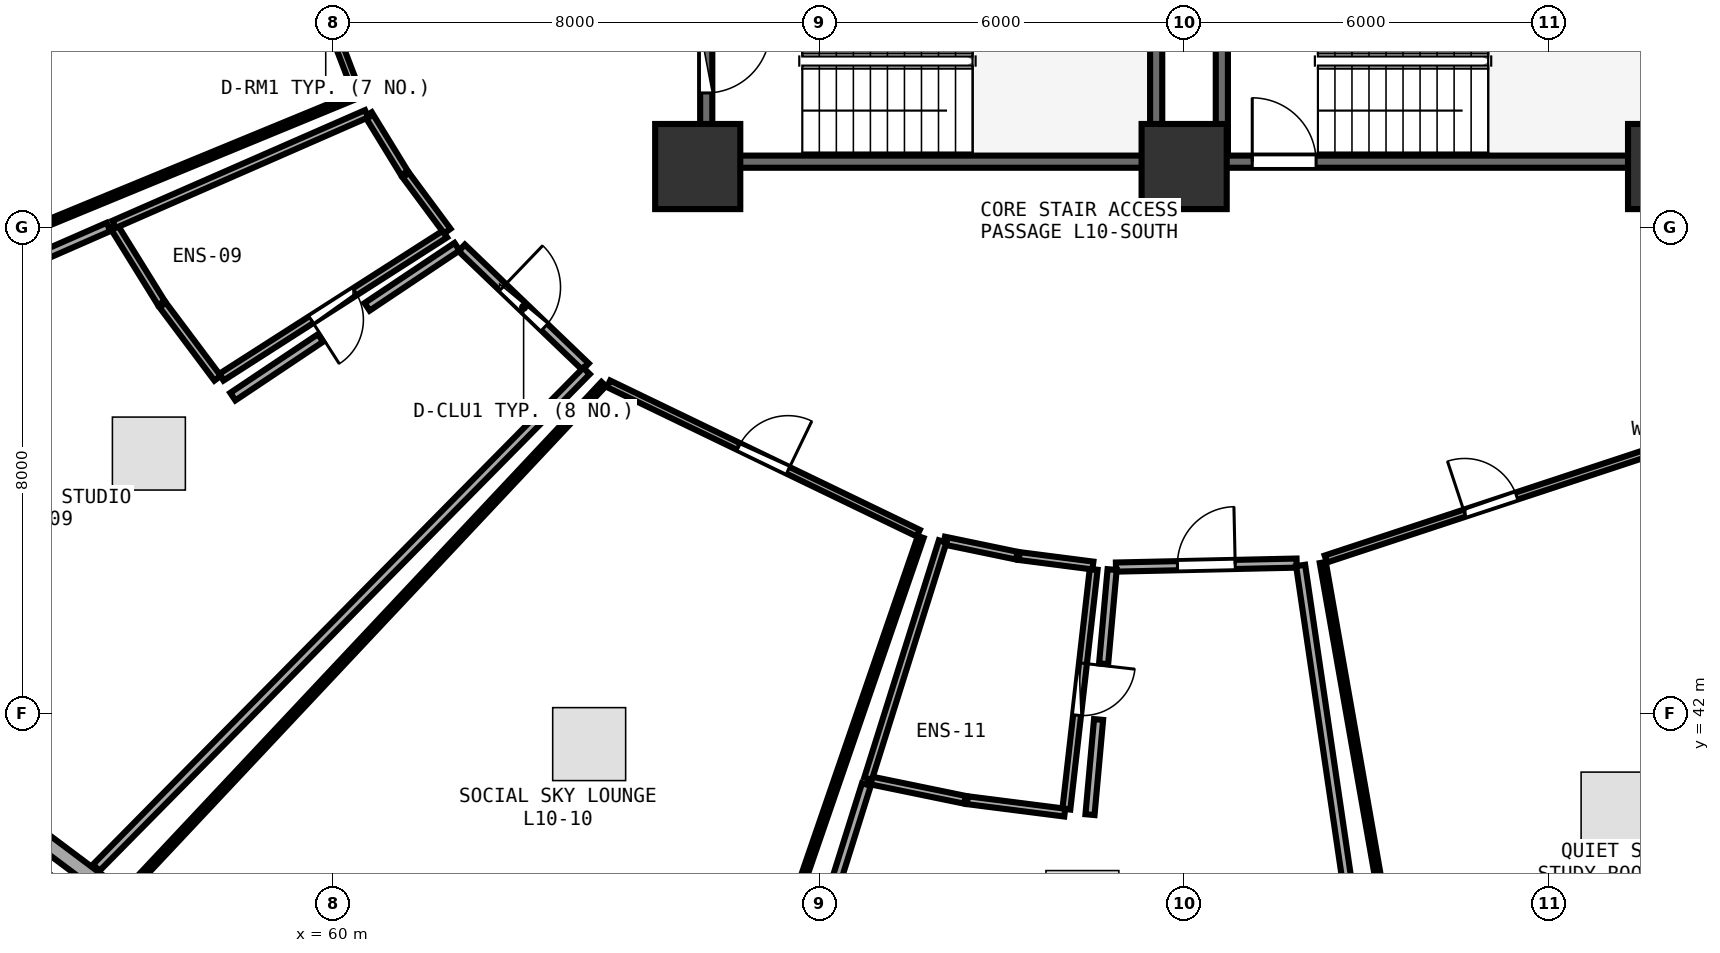
"""IFC4 building model, lengths in metres.
Left out: names, types, materials, properties, quantities, classifications, styles, units other than length and angle.
Written with IfcOpenShell. Run it as: python <this file> out.ifc"""

import sys

from ifc_helpers import new_model, si_unit, direction, frame, frame_2d, origin, origin_2d, place, context, subcontext, project, spatial, rectangle, extrude, element, fill, save


model = new_model("IFC4")
c1 = context("Model", 3, precision=1e-05, world=origin(), true_north=direction((0.0, 1.0)))
c2 = subcontext(c1, "Body", "Model", "MODEL_VIEW")
j1 = project(units=[si_unit("LENGTHUNIT", "METRE"), si_unit("PLANEANGLEUNIT", "RADIAN")], contexts=[c1])
p1 = place(None, origin())
s1 = spatial("IfcSite", under=j1, at=p1, CompositionType="ELEMENT")
p2 = place(p1, origin())
s2 = spatial("IfcBuilding", under=s1, at=p2, CompositionType="ELEMENT")
p3 = place(p2, frame((0.0, 0.0, 41.25)))
s3 = spatial("IfcBuildingStorey", under=s2, at=p3, CompositionType="ELEMENT", Elevation=41.25)
for number, where, z_axis, x_axis in (
    (1, (66.0, 51.0, 0.0), (0.0, 0.0, 1.0), (1.0, 0.0, 0.0)),
    (2, (74.0, 51.0, 0.0), (0.0, 0.0, 1.0), (1.0, 0.0, 0.0)),
    (3, (82.0, 51.0, 0.0), (0.0, 0.0, 1.0), (1.0, 0.0, 0.0)),
):
    element("IfcColumn", number, at=place(p3, frame(where, z_axis=z_axis, x_axis=x_axis)), inside=s3, PredefinedType="PILASTER", context=c2, shape_type="SweptSolid", body=[
        extrude(rectangle(XDim=1.4, YDim=1.4, at=origin_2d()), origin(), (0.0, 0.0, 1.0), 3.75),
    ])
p4 = place(p3, frame((53.016, 41.582, 0.0), z_axis=(0.0, 0.0, 1.0), x_axis=(0.80030733173, -0.599590005569, 0.0)))
e4 = element("IfcWall", 4, at=p4, inside=s3, PredefinedType="SOLIDWALL", context=c2, shape_type="SweptSolid", body=[
    extrude(rectangle(XDim=8.291, YDim=0.26, at=frame_2d((4.145, 0.0))), origin(), (0.0, 0.0, 1.0), 3.475),
])
p5 = place(p4, frame((4.785, 0.0, 0.85)))
e5 = element("IfcOpeningElement", 5, at=p5, cuts=e4, PredefinedType="OPENING", context=c2, shape_type="SweptSolid", body=[
    extrude(rectangle(XDim=1.6, YDim=1.45, at=frame_2d((0.8, 0.725))), frame((0.0, 0.14, 0.0), z_axis=(0.0, -1.0, 0.0), x_axis=(1.0, 0.0, 0.0)), (0.0, 0.0, 1.0), 0.28),
])
p6 = place(p3, frame((74.0, 51.08, 0.0), z_axis=(0.0, 0.0, 1.0), x_axis=(1.0, 0.0, 0.0)))
e6 = element("IfcWall", 6, at=p6, inside=s3, PredefinedType="SHEAR", context=c2, shape_type="SweptSolid", body=[
    extrude(rectangle(XDim=7.9, YDim=0.2, at=frame_2d((3.95, 0.0))), origin(), (0.0, 0.0, 1.0), 3.49),
])
p7 = place(p6, frame((1.12, 0.0, 0.0)))
e7 = element("IfcOpeningElement", 7, at=p7, cuts=e6, PredefinedType="OPENING", context=c2, shape_type="SweptSolid", body=[
    extrude(rectangle(XDim=1.05, YDim=2.1, at=frame_2d((0.525, 1.05))), frame((0.0, 0.11, 0.0), z_axis=(0.0, -1.0, 0.0), x_axis=(1.0, 0.0, 0.0)), (0.0, 0.0, 1.0), 0.22),
])
p8 = place(p3, frame((74.62, 54.27, 0.0), z_axis=(0.0, 0.0, 1.0), x_axis=(0.0, -1.0, 0.0)))
e8 = element("IfcWall", 8, at=p8, inside=s3, PredefinedType="SHEAR", context=c2, shape_type="SweptSolid", body=[
    extrude(rectangle(XDim=3.07, YDim=0.2, at=frame_2d((1.535, 0.0))), origin(), (0.0, 0.0, 1.0), 3.49),
])
p9 = place(p3, frame((66.26, 51.08, 0.0), z_axis=(0.0, 0.0, 1.0), x_axis=(1.0, 0.0, 0.0)))
e9 = element("IfcWall", 9, at=p9, inside=s3, PredefinedType="SHEAR", context=c2, shape_type="SweptSolid", body=[
    extrude(rectangle(XDim=7.16, YDim=0.2, at=frame_2d((3.58, 0.0))), origin(), (0.0, 0.0, 1.0), 3.49),
])
p10 = place(p3, frame((73.54, 51.2, 0.0), z_axis=(0.0, 0.0, 1.0), x_axis=(0.0, 1.0, 0.0)))
e10 = element("IfcWall", 10, at=p10, inside=s3, PredefinedType="SHEAR", context=c2, shape_type="SweptSolid", body=[
    extrude(rectangle(XDim=3.07, YDim=0.2, at=frame_2d((1.535, 0.0))), origin(), (0.0, 0.0, 1.0), 3.49),
])
p11 = place(p3, frame((66.14, 54.27, 0.0), z_axis=(0.0, 0.0, 1.0), x_axis=(0.0, -1.0, 0.0)))
e11 = element("IfcWall", 11, at=p11, inside=s3, PredefinedType="SHEAR", context=c2, shape_type="SweptSolid", body=[
    extrude(rectangle(XDim=3.07, YDim=0.2, at=frame_2d((1.535, 0.0))), origin(), (0.0, 0.0, 1.0), 3.49),
])
p12 = place(p11, frame((1.01, 0.0, 0.0)))
e12 = element("IfcOpeningElement", 12, at=p12, cuts=e11, PredefinedType="OPENING", context=c2, shape_type="SweptSolid", body=[
    extrude(rectangle(XDim=1.05, YDim=2.1, at=frame_2d((0.525, 1.05))), frame((0.0, 0.11, 0.0), z_axis=(0.0, -1.0, 0.0), x_axis=(1.0, 0.0, 0.0)), (0.0, 0.0, 1.0), 0.22),
])
p13 = place(p3, frame((59.373, 54.891, 0.0), z_axis=(0.0, 0.0, 1.0), x_axis=(0.357203455119, -0.934026601147, 0.0)))
e13 = element("IfcWall", 13, at=p13, inside=s3, PredefinedType="PARTITIONING", context=c2, shape_type="SweptSolid", body=[
    extrude(rectangle(XDim=2.848, YDim=0.12, at=frame_2d((1.424, 0.0))), origin(), (0.0, 0.0, 1.0), 3.48),
])
p14 = place(p13, frame((0.974, 0.0, 0.0)))
e14 = element("IfcOpeningElement", 14, at=p14, cuts=e13, PredefinedType="OPENING", context=c2, shape_type="SweptSolid", body=[
    extrude(rectangle(XDim=0.9, YDim=2.08, at=frame_2d((0.45, 1.04))), frame((0.0, 0.07, 0.0), z_axis=(0.0, -1.0, 0.0), x_axis=(1.0, 0.0, 0.0)), (0.0, 0.0, 1.0), 0.14),
])
p15 = place(p3, frame((61.844, 49.89, 0.0), z_axis=(0.0, 0.0, 1.0), x_axis=(-0.842235862163, -0.539109221297, 0.0)))
e15 = element("IfcWall", 15, at=p15, inside=s3, PredefinedType="PLUMBINGWALL", context=c2, shape_type="SweptSolid", body=[
    extrude(rectangle(XDim=4.367, YDim=0.13, at=frame_2d((2.184, 0.0))), origin(), (0.0, 0.0, 1.0), 3.235),
])
p16 = place(p15, frame((1.754, 0.0, 0.0)))
e16 = element("IfcOpeningElement", 16, at=p16, cuts=e15, PredefinedType="OPENING", context=c2, shape_type="SweptSolid", body=[
    extrude(rectangle(XDim=0.86, YDim=2.05, at=frame_2d((0.43, 1.025))), frame((0.0, 0.075, 0.0), z_axis=(0.0, -1.0, 0.0), x_axis=(1.0, 0.0, 0.0)), (0.0, 0.0, 1.0), 0.15),
])
p17 = place(p3, frame((62.118, 49.663, 0.0), z_axis=(0.0, 0.0, 1.0), x_axis=(0.721698326825, -0.692207718144, 0.0)))
e17 = element("IfcWall", 17, at=p17, inside=s3, PredefinedType="PARTITIONING", context=c2, shape_type="SweptSolid", body=[
    extrude(rectangle(XDim=2.823, YDim=0.15, at=frame_2d((1.412, 0.0))), origin(), (0.0, 0.0, 1.0), 2.875),
])
p18 = place(p17, frame((0.936, 0.0, 0.0)))
e18 = element("IfcOpeningElement", 18, at=p18, cuts=e17, PredefinedType="OPENING", context=c2, shape_type="SweptSolid", body=[
    extrude(rectangle(XDim=0.95, YDim=2.08, at=frame_2d((0.475, 1.04))), frame((0.0, 0.085, 0.0), z_axis=(0.0, -1.0, 0.0), x_axis=(1.0, 0.0, 0.0)), (0.0, 0.0, 1.0), 0.17),
])
p19 = place(p3, frame((64.534, 47.427, 0.0), z_axis=(0.0, 0.0, 1.0), x_axis=(0.900751487373, -0.434334845477, 0.0)))
e19 = element("IfcWall", 19, at=p19, inside=s3, PredefinedType="PARTITIONING", context=c2, shape_type="SweptSolid", body=[
    extrude(rectangle(XDim=5.654, YDim=0.12, at=frame_2d((2.827, 0.0))), origin(), (0.0, 0.0, 1.0), 2.875),
])
p20 = place(p19, frame((2.377, 0.0, 0.0)))
e20 = element("IfcOpeningElement", 20, at=p20, cuts=e19, PredefinedType="OPENING", context=c2, shape_type="SweptSolid", body=[
    extrude(rectangle(XDim=0.9, YDim=2.08, at=frame_2d((0.45, 1.04))), frame((0.0, 0.07, 0.0), z_axis=(0.0, -1.0, 0.0), x_axis=(1.0, 0.0, 0.0)), (0.0, 0.0, 1.0), 0.14),
])
p21 = place(p3, frame((72.512, 44.376, 0.0), z_axis=(0.0, 0.0, 1.0), x_axis=(-0.113232612293, -0.993568505697, 0.0)))
e21 = element("IfcWall", 21, at=p21, inside=s3, PredefinedType="PLUMBINGWALL", context=c2, shape_type="SweptSolid", body=[
    extrude(rectangle(XDim=3.969, YDim=0.13, at=frame_2d((1.985, 0.0))), origin(), (0.0, 0.0, 1.0), 3.175),
])
p22 = place(p21, frame((1.555, 0.0, 0.0)))
e22 = element("IfcOpeningElement", 22, at=p22, cuts=e21, PredefinedType="OPENING", context=c2, shape_type="SweptSolid", body=[
    extrude(rectangle(XDim=0.86, YDim=2.05, at=frame_2d((0.43, 1.025))), frame((0.0, 0.075, 0.0), z_axis=(0.0, -1.0, 0.0), x_axis=(1.0, 0.0, 0.0)), (0.0, 0.0, 1.0), 0.15),
])
p23 = place(p3, frame((72.879, 44.413, 0.0), z_axis=(0.0, 0.0, 1.0), x_axis=(0.999757617916, 0.022016026426, 0.0)))
e23 = element("IfcWall", 23, at=p23, inside=s3, PredefinedType="PARTITIONING", context=c2, shape_type="SweptSolid", body=[
    extrude(rectangle(XDim=2.972, YDim=0.15, at=frame_2d((1.486, 0.0))), origin(), (0.0, 0.0, 1.0), 3.48),
])
p24 = place(p23, frame((1.011, 0.0, 0.0)))
e24 = element("IfcOpeningElement", 24, at=p24, cuts=e23, PredefinedType="OPENING", context=c2, shape_type="SweptSolid", body=[
    extrude(rectangle(XDim=0.95, YDim=2.08, at=frame_2d((0.475, 1.04))), frame((0.0, 0.085, 0.0), z_axis=(0.0, -1.0, 0.0), x_axis=(1.0, 0.0, 0.0)), (0.0, 0.0, 1.0), 0.17),
])
p25 = place(p3, frame((76.33, 44.546, 0.0), z_axis=(0.0, 0.0, 1.0), x_axis=(0.949607265123, 0.313442246716, 0.0)))
e25 = element("IfcWall", 25, at=p25, inside=s3, PredefinedType="PARTITIONING", context=c2, shape_type="SweptSolid", body=[
    extrude(rectangle(XDim=5.708, YDim=0.12, at=frame_2d((2.854, 0.0))), origin(), (0.0, 0.0, 1.0), 2.875),
])
p26 = place(p25, frame((2.404, 0.0, 0.0)))
e26 = element("IfcOpeningElement", 26, at=p26, cuts=e25, PredefinedType="OPENING", context=c2, shape_type="SweptSolid", body=[
    extrude(rectangle(XDim=0.9, YDim=2.08, at=frame_2d((0.45, 1.04))), frame((0.0, 0.07, 0.0), z_axis=(0.0, -1.0, 0.0), x_axis=(1.0, 0.0, 0.0)), (0.0, 0.0, 1.0), 0.14),
])
p27 = place(p3, frame((60.375, 52.16, 0.0), z_axis=(0.0, 0.0, 1.0), x_axis=(-0.924608681042, -0.380918346817, 0.0)))
e27 = element("IfcWall", 27, at=p27, inside=s3, PredefinedType="PARTITIONING", context=c2, shape_type="SweptSolid", body=[
    extrude(rectangle(XDim=12.094, YDim=0.1, at=frame_2d((6.047, 0.0))), origin(), (0.0, 0.0, 1.0), 2.875),
])
p28 = place(p3, frame((47.257, 52.525, 0.0), z_axis=(0.0, 0.0, 1.0), x_axis=(0.980535537362, 0.196341691878, 0.0)))
e28 = element("IfcWall", 28, at=p28, inside=s3, PredefinedType="PARTITIONING", context=c2, shape_type="SweptSolid", body=[
    extrude(rectangle(XDim=8.95, YDim=0.1, at=frame_2d((4.475, 0.0))), origin(), (0.0, 0.0, 1.0), 2.875),
])
p29 = place(p3, frame((60.583, 51.859, 0.0), z_axis=(0.0, 0.0, 1.0), x_axis=(0.52310141153, -0.852270446077, 0.0)))
e29 = element("IfcWall", 29, at=p29, inside=s3, PredefinedType="PLUMBINGWALL", context=c2, shape_type="SweptSolid", body=[
    extrude(rectangle(XDim=1.135, YDim=0.13, at=frame_2d((0.568, 0.0))), origin(), (0.0, 0.0, 1.0), 3.48),
])
p30 = place(p3, frame((61.2, 50.858, 0.0), z_axis=(0.0, 0.0, 1.0), x_axis=(0.595625136946, -0.803262532574, 0.0)))
e30 = element("IfcWall", 30, at=p30, inside=s3, PredefinedType="PLUMBINGWALL", context=c2, shape_type="SweptSolid", body=[
    extrude(rectangle(XDim=1.145, YDim=0.13, at=frame_2d((0.573, 0.0))), origin(), (0.0, 0.0, 1.0), 2.875),
])
p31 = place(p3, frame((58.103, 47.519, 0.0), z_axis=(0.0, 0.0, 1.0), x_axis=(-0.599662382917, 0.800253101533, 0.0)))
e31 = element("IfcWall", 31, at=p31, inside=s3, PredefinedType="PLUMBINGWALL", context=c2, shape_type="SweptSolid", body=[
    extrude(rectangle(XDim=1.504, YDim=0.13, at=frame_2d((0.752, 0.0))), origin(), (0.0, 0.0, 1.0), 3.48),
])
p32 = place(p3, frame((57.178, 48.756, 0.0), z_axis=(0.0, 0.0, 1.0), x_axis=(-0.526861637299, 0.849951066323, 0.0)))
e32 = element("IfcWall", 32, at=p32, inside=s3, PredefinedType="PLUMBINGWALL", context=c2, shape_type="SweptSolid", body=[
    extrude(rectangle(XDim=1.492, YDim=0.13, at=frame_2d((0.746, 0.0))), origin(), (0.0, 0.0, 1.0), 3.48),
])
p33 = place(p3, frame((56.4, 50.049, 0.0), z_axis=(0.0, 0.0, 1.0), x_axis=(0.91604857307, 0.401067340701, 0.0)))
e33 = element("IfcWall", 33, at=p33, inside=s3, PredefinedType="PLUMBINGWALL", context=c2, shape_type="SweptSolid", body=[
    extrude(rectangle(XDim=4.535, YDim=0.13, at=frame_2d((2.268, 0.0))), origin(), (0.0, 0.0, 1.0), 2.875),
])
p34 = place(p3, frame((64.171, 47.638, 0.0), z_axis=(0.0, 0.0, 1.0), x_axis=(-0.702465266663, -0.711718026421, 0.0)))
e34 = element("IfcWall", 34, at=p34, inside=s3, PredefinedType="PARTITIONING", context=c2, shape_type="SweptSolid", body=[
    extrude(rectangle(XDim=11.478, YDim=0.15, at=frame_2d((5.739, 0.0))), origin(), (0.0, 0.0, 1.0), 2.875),
])
p35 = place(p3, frame((49.487, 47.017, 0.0), z_axis=(0.0, 0.0, 1.0), x_axis=(0.915920983282, 0.401358633124, 0.0)))
e35 = element("IfcWall", 35, at=p35, inside=s3, PredefinedType="PARTITIONING", context=c2, shape_type="SweptSolid", body=[
    extrude(rectangle(XDim=7.449, YDim=0.15, at=frame_2d((3.725, 0.0))), origin(), (0.0, 0.0, 1.0), 2.875),
])
p36 = place(p3, frame((58.354, 47.216, 0.0), z_axis=(0.0, 0.0, 1.0), x_axis=(0.831292382958, 0.555835383937, 0.0)))
e36 = element("IfcWall", 36, at=p36, inside=s3, PredefinedType="PARTITIONING", context=c2, shape_type="SweptSolid", body=[
    extrude(rectangle(XDim=1.736, YDim=0.15, at=frame_2d((0.868, 0.0))), origin(), (0.0, 0.0, 1.0), 3.48),
])
p37 = place(p3, frame((60.563, 48.693, 0.0), z_axis=(0.0, 0.0, 1.0), x_axis=(0.831268380724, 0.555871279352, 0.0)))
e37 = element("IfcWall", 37, at=p37, inside=s3, PredefinedType="PARTITIONING", context=c2, shape_type="SweptSolid", body=[
    extrude(rectangle(XDim=1.779, YDim=0.15, at=frame_2d((0.89, 0.0))), origin(), (0.0, 0.0, 1.0), 3.235),
])
p38 = place(p3, frame((69.668, 44.907, 0.0), z_axis=(0.0, 0.0, 1.0), x_axis=(-0.325549997896, -0.94552482721, 0.0)))
e38 = element("IfcWall", 38, at=p38, inside=s3, PredefinedType="PARTITIONING", context=c2, shape_type="SweptSolid", body=[
    extrude(rectangle(XDim=10.911, YDim=0.1, at=frame_2d((5.456, 0.0))), origin(), (0.0, 0.0, 1.0), 2.875),
])
p39 = place(p3, frame((56.622, 39.085, 0.0), z_axis=(0.0, 0.0, 1.0), x_axis=(0.684539394854, 0.728975868526, 0.0)))
e39 = element("IfcWall", 39, at=p39, inside=s3, PredefinedType="PARTITIONING", context=c2, shape_type="SweptSolid", body=[
    extrude(rectangle(XDim=11.439, YDim=0.1, at=frame_2d((5.719, 0.0))), origin(), (0.0, 0.0, 1.0), 2.875),
])
p40 = place(p3, frame((70.054, 44.849, 0.0), z_axis=(0.0, 0.0, 1.0), x_axis=(0.979121805859, -0.203274418684, 0.0)))
e40 = element("IfcWall", 40, at=p40, inside=s3, PredefinedType="PLUMBINGWALL", context=c2, shape_type="SweptSolid", body=[
    extrude(rectangle(XDim=1.219, YDim=0.13, at=frame_2d((0.609, 0.0))), origin(), (0.0, 0.0, 1.0), 3.235),
])
p41 = place(p3, frame((71.287, 44.594, 0.0), z_axis=(0.0, 0.0, 1.0), x_axis=(0.991848040681, -0.127426308891, 0.0)))
e41 = element("IfcWall", 41, at=p41, inside=s3, PredefinedType="PLUMBINGWALL", context=c2, shape_type="SweptSolid", body=[
    extrude(rectangle(XDim=1.222, YDim=0.13, at=frame_2d((0.611, 0.0))), origin(), (0.0, 0.0, 1.0), 3.235),
])
p42 = place(p3, frame((72.036, 40.375, 0.0), z_axis=(0.0, 0.0, 1.0), x_axis=(-0.991984482756, 0.126359748222, 0.0)))
e42 = element("IfcWall", 42, at=p42, inside=s3, PredefinedType="PLUMBINGWALL", context=c2, shape_type="SweptSolid", body=[
    extrude(rectangle(XDim=1.615, YDim=0.13, at=frame_2d((0.808, 0.0))), origin(), (0.0, 0.0, 1.0), 3.48),
])
p43 = place(p3, frame((70.394, 40.586, 0.0), z_axis=(0.0, 0.0, 1.0), x_axis=(-0.979464082354, 0.201618727747, 0.0)))
e43 = element("IfcWall", 43, at=p43, inside=s3, PredefinedType="PLUMBINGWALL", context=c2, shape_type="SweptSolid", body=[
    extrude(rectangle(XDim=1.612, YDim=0.13, at=frame_2d((0.806, 0.0))), origin(), (0.0, 0.0, 1.0), 3.175),
])
p44 = place(p3, frame((68.802, 40.934, 0.0), z_axis=(0.0, 0.0, 1.0), x_axis=(0.299913557671, 0.953966381968, 0.0)))
e44 = element("IfcWall", 44, at=p44, inside=s3, PredefinedType="PLUMBINGWALL", context=c2, shape_type="SweptSolid", body=[
    extrude(rectangle(XDim=4.088, YDim=0.13, at=frame_2d((2.044, 0.0))), origin(), (0.0, 0.0, 1.0), 3.175),
])
p45 = place(p3, frame((75.916, 44.44, 0.0), z_axis=(0.0, 0.0, 1.0), x_axis=(0.145430849227, -0.989368418787, 0.0)))
e45 = element("IfcWall", 45, at=p45, inside=s3, PredefinedType="PARTITIONING", context=c2, shape_type="SweptSolid", body=[
    extrude(rectangle(XDim=10.798, YDim=0.15, at=frame_2d((5.399, 0.0))), origin(), (0.0, 0.0, 1.0), 2.875),
])
p46 = place(p3, frame((66.761, 34.426, 0.0), z_axis=(0.0, 0.0, 1.0), x_axis=(0.299536567827, 0.954084820409, 0.0)))
e46 = element("IfcWall", 46, at=p46, inside=s3, PredefinedType="PARTITIONING", context=c2, shape_type="SweptSolid", body=[
    extrude(rectangle(XDim=6.72, YDim=0.15, at=frame_2d((3.36, 0.0))), origin(), (0.0, 0.0, 1.0), 2.875),
])
p47 = place(p3, frame((72.452, 40.342, 0.0), z_axis=(0.0, 0.0, 1.0), x_axis=(0.089821137984, 0.995957912349, 0.0)))
e47 = element("IfcWall", 47, at=p47, inside=s3, PredefinedType="PARTITIONING", context=c2, shape_type="SweptSolid", body=[
    extrude(rectangle(XDim=1.571, YDim=0.15, at=frame_2d((0.786, 0.0))), origin(), (0.0, 0.0, 1.0), 3.175),
])
p48 = place(p3, frame((72.676, 42.823, 0.0), z_axis=(0.0, 0.0, 1.0), x_axis=(0.089927260711, 0.9959483359, 0.0)))
e48 = element("IfcWall", 48, at=p48, inside=s3, PredefinedType="PARTITIONING", context=c2, shape_type="SweptSolid", body=[
    extrude(rectangle(XDim=1.556, YDim=0.15, at=frame_2d((0.778, 0.0))), origin(), (0.0, 0.0, 1.0), 3.48),
])
p49 = place(p3, frame((78.01, 34.635, 0.0), z_axis=(0.0, 0.0, 1.0), x_axis=(-0.173016726169, 0.984918886237, 0.0)))
e49 = element("IfcWall", 49, at=p49, inside=s3, PredefinedType="PARTITIONING", context=c2, shape_type="SweptSolid", body=[
    extrude(rectangle(XDim=10.003, YDim=0.1, at=frame_2d((5.001, 0.0))), origin(), (0.0, 0.0, 1.0), 3.175),
])
p50 = place(p7, origin())
e50 = element("IfcDoor", 50, at=p50, inside=s3, OperationType="SINGLE_SWING_LEFT", PredefinedType="DOOR", context=c2, shape_type="SweptSolid", body=[
    extrude(rectangle(XDim=1.05, YDim=2.1, at=frame_2d((0.525, 1.05))), frame((0.0, 0.025, 0.0), z_axis=(0.0, -1.0, 0.0), x_axis=(1.0, 0.0, 0.0)), (0.0, 0.0, 1.0), 0.05),
])
fill(e7, e50)
p51 = place(p12, origin())
e51 = element("IfcDoor", 51, at=p51, inside=s3, OperationType="SINGLE_SWING_LEFT", PredefinedType="DOOR", context=c2, shape_type="SweptSolid", body=[
    extrude(rectangle(XDim=1.05, YDim=2.1, at=frame_2d((0.525, 1.05))), frame((0.0, 0.025, 0.0), z_axis=(0.0, -1.0, 0.0), x_axis=(1.0, 0.0, 0.0)), (0.0, 0.0, 1.0), 0.05),
])
fill(e12, e51)
p52 = place(p16, origin())
e52 = element("IfcDoor", 52, at=p52, inside=s3, OperationType="SINGLE_SWING_RIGHT", PredefinedType="DOOR", context=c2, shape_type="SweptSolid", body=[
    extrude(rectangle(XDim=0.86, YDim=2.05, at=frame_2d((0.43, 1.025))), frame((0.0, 0.025, 0.0), z_axis=(0.0, -1.0, 0.0), x_axis=(1.0, 0.0, 0.0)), (0.0, 0.0, 1.0), 0.05),
])
fill(e16, e52)
p53 = place(p18, origin())
e53 = element("IfcDoor", 53, at=p53, inside=s3, OperationType="SINGLE_SWING_LEFT", PredefinedType="DOOR", context=c2, shape_type="SweptSolid", body=[
    extrude(rectangle(XDim=0.95, YDim=2.08, at=frame_2d((0.475, 1.04))), frame((0.0, 0.025, 0.0), z_axis=(0.0, -1.0, 0.0), x_axis=(1.0, 0.0, 0.0)), (0.0, 0.0, 1.0), 0.05),
])
fill(e18, e53)
p54 = place(p20, origin())
e54 = element("IfcDoor", 54, at=p54, inside=s3, OperationType="SINGLE_SWING_RIGHT", PredefinedType="DOOR", context=c2, shape_type="SweptSolid", body=[
    extrude(rectangle(XDim=0.9, YDim=2.08, at=frame_2d((0.45, 1.04))), frame((0.0, 0.025, 0.0), z_axis=(0.0, -1.0, 0.0), x_axis=(1.0, 0.0, 0.0)), (0.0, 0.0, 1.0), 0.05),
])
fill(e20, e54)
p55 = place(p22, origin())
e55 = element("IfcDoor", 55, at=p55, inside=s3, OperationType="SINGLE_SWING_LEFT", PredefinedType="DOOR", context=c2, shape_type="SweptSolid", body=[
    extrude(rectangle(XDim=0.86, YDim=2.05, at=frame_2d((0.43, 1.025))), frame((0.0, 0.025, 0.0), z_axis=(0.0, -1.0, 0.0), x_axis=(1.0, 0.0, 0.0)), (0.0, 0.0, 1.0), 0.05),
])
fill(e22, e55)
p56 = place(p24, origin())
e56 = element("IfcDoor", 56, at=p56, inside=s3, OperationType="SINGLE_SWING_RIGHT", PredefinedType="DOOR", context=c2, shape_type="SweptSolid", body=[
    extrude(rectangle(XDim=0.95, YDim=2.08, at=frame_2d((0.475, 1.04))), frame((0.0, 0.025, 0.0), z_axis=(0.0, -1.0, 0.0), x_axis=(1.0, 0.0, 0.0)), (0.0, 0.0, 1.0), 0.05),
])
fill(e24, e56)
p57 = place(p26, origin())
e57 = element("IfcDoor", 57, at=p57, inside=s3, OperationType="SINGLE_SWING_LEFT", PredefinedType="DOOR", context=c2, shape_type="SweptSolid", body=[
    extrude(rectangle(XDim=0.9, YDim=2.08, at=frame_2d((0.45, 1.04))), frame((0.0, 0.025, 0.0), z_axis=(0.0, -1.0, 0.0), x_axis=(1.0, 0.0, 0.0)), (0.0, 0.0, 1.0), 0.05),
])
fill(e26, e57)
save(model, sys.argv[1])
